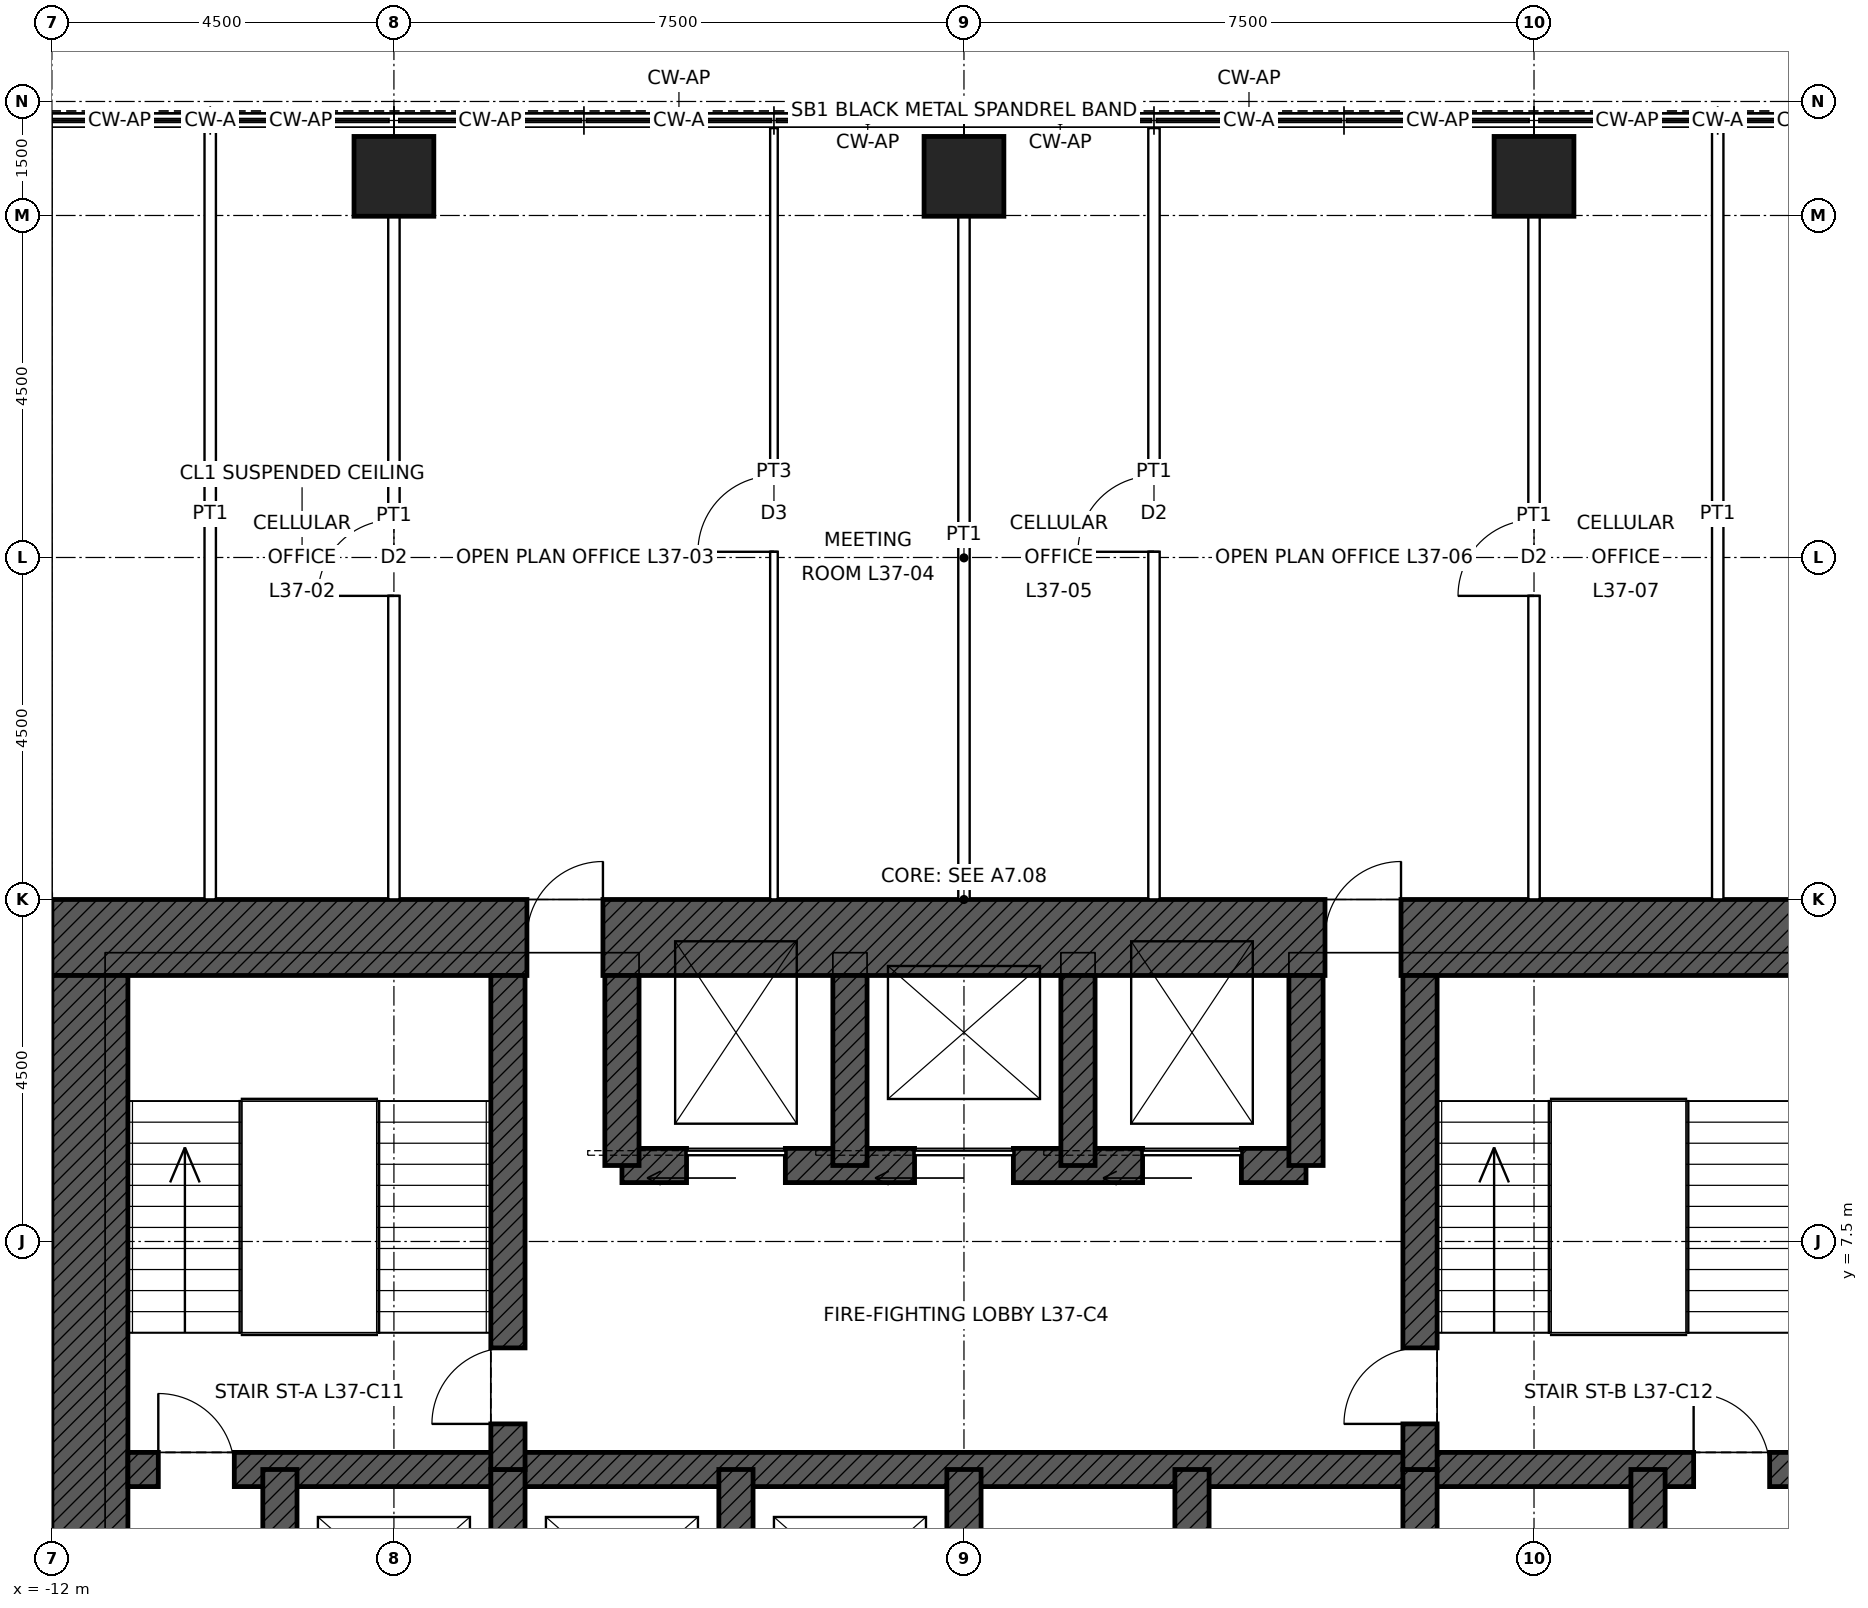
"""IFC4 building model, lengths in metres.
Left out: names, types, materials, properties, quantities, classifications, styles, units other than length and angle.
Written with IfcOpenShell. Run it as: python <this file> out.ifc"""

import sys

from ifc_helpers import new_model, si_unit, direction, frame, frame_2d, origin, origin_2d, place, context, subcontext, project, spatial, rectangle, hollow_rectangle, extrude, element, fill, save


model = new_model("IFC4")
c1 = context("Model", 3, precision=1e-05, world=origin(), true_north=direction((0.0, 1.0)))
c2 = subcontext(c1, "Body", "Model", "MODEL_VIEW")
j1 = project(units=[si_unit("LENGTHUNIT", "METRE"), si_unit("PLANEANGLEUNIT", "RADIAN")], contexts=[c1])
p1 = place(None, origin())
s1 = spatial("IfcSite", under=j1, at=p1, CompositionType="ELEMENT")
p2 = place(p1, origin())
s2 = spatial("IfcBuilding", under=s1, at=p2, CompositionType="ELEMENT")
p3 = place(p2, frame((0.0, 0.0, 181.9)))
s3 = spatial("IfcBuildingStorey", under=s2, at=p3, CompositionType="ELEMENT", Elevation=181.9)
p4 = place(p3, frame((-7.5, 21.515, 0.0), z_axis=(0.0, 0.0, 1.0), x_axis=(1.0, 0.0, 0.0)))
e1 = element("IfcColumn", 1, at=p4, inside=s3, PredefinedType="COLUMN", context=c2, shape_type="SweptSolid", body=[
    extrude(hollow_rectangle(XDim=1.05, YDim=1.05, WallThickness=0.075, at=origin_2d()), origin(), (0.0, 0.0, 1.0), 4.0),
])
p5 = place(p3, frame((0.0, 21.515, 0.0), z_axis=(0.0, 0.0, 1.0), x_axis=(1.0, 0.0, 0.0)))
e2 = element("IfcColumn", 2, at=p5, inside=s3, PredefinedType="COLUMN", context=c2, shape_type="SweptSolid", body=[
    extrude(hollow_rectangle(XDim=1.05, YDim=1.05, WallThickness=0.07, at=origin_2d()), origin(), (0.0, 0.0, 1.0), 4.0),
])
p6 = place(p3, frame((7.5, 21.515, 0.0), z_axis=(0.0, 0.0, 1.0), x_axis=(1.0, 0.0, 0.0)))
e3 = element("IfcColumn", 3, at=p6, inside=s3, PredefinedType="COLUMN", context=c2, shape_type="SweptSolid", body=[
    extrude(hollow_rectangle(XDim=1.05, YDim=1.05, WallThickness=0.075, at=origin_2d()), origin(), (0.0, 0.0, 1.0), 4.0),
])
p7 = place(p3, frame((-12.0, 11.5, 0.0), z_axis=(0.0, 0.0, 1.0), x_axis=(1.0, 0.0, 0.0)))
e4 = element("IfcWall", 4, at=p7, inside=s3, PredefinedType="SHEAR", context=c2, shape_type="SweptSolid", body=[
    extrude(rectangle(XDim=24.0, YDim=1.0, at=frame_2d((12.0, 0.0))), origin(), (0.0, 0.0, 1.0), 4.0),
])
p8 = place(p7, frame((6.25, 0.0, 0.0)))
e5 = element("IfcOpeningElement", 5, at=p8, cuts=e4, PredefinedType="OPENING", context=c2, shape_type="SweptSolid", body=[
    extrude(rectangle(XDim=1.0, YDim=2.4, at=frame_2d((0.5, 1.2))), frame((0.0, 0.51, 0.0), z_axis=(0.0, -1.0, 0.0), x_axis=(1.0, 0.0, 0.0)), (0.0, 0.0, 1.0), 1.02),
])
p9 = place(p7, frame((16.75, 0.0, 0.0)))
e6 = element("IfcOpeningElement", 6, at=p9, cuts=e4, PredefinedType="OPENING", context=c2, shape_type="SweptSolid", body=[
    extrude(rectangle(XDim=1.0, YDim=2.4, at=frame_2d((0.5, 1.2))), frame((0.0, 0.51, 0.0), z_axis=(0.0, -1.0, 0.0), x_axis=(1.0, 0.0, 0.0)), (0.0, 0.0, 1.0), 1.02),
])
p10 = place(p3, frame((-11.5, -11.0, 0.0), z_axis=(0.0, 0.0, 1.0), x_axis=(0.0, 1.0, 0.0)))
e7 = element("IfcWall", 7, at=p10, inside=s3, PredefinedType="SHEAR", context=c2, shape_type="SweptSolid", body=[
    extrude(rectangle(XDim=22.0, YDim=1.0, at=frame_2d((11.0, 0.0))), origin(), (0.0, 0.0, 1.0), 4.0),
])
p11 = place(p10, frame((10.5, 0.0, 0.0)))
e8 = element("IfcOpeningElement", 8, at=p11, cuts=e7, PredefinedType="OPENING", context=c2, shape_type="SweptSolid", body=[
    extrude(rectangle(XDim=1.0, YDim=2.4, at=frame_2d((0.5, 1.2))), frame((0.0, 0.51, 0.0), z_axis=(0.0, -1.0, 0.0), x_axis=(1.0, 0.0, 0.0)), (0.0, 0.0, 1.0), 1.02),
])
p12 = place(p3, frame((-11.0, 4.5, 0.0), z_axis=(0.0, 0.0, 1.0), x_axis=(1.0, 0.0, 0.0)))
e9 = element("IfcWall", 9, at=p12, inside=s3, PredefinedType="SHEAR", context=c2, shape_type="SweptSolid", body=[
    extrude(rectangle(XDim=22.0, YDim=0.45, at=frame_2d((11.0, 0.0))), origin(), (0.0, 0.0, 1.0), 4.0),
])
p13 = place(p12, frame((0.4, 0.0, 0.0)))
e10 = element("IfcOpeningElement", 10, at=p13, cuts=e9, PredefinedType="OPENING", context=c2, shape_type="SweptSolid", body=[
    extrude(rectangle(XDim=1.0, YDim=2.1, at=frame_2d((0.5, 1.05))), frame((0.0, 0.235, 0.0), z_axis=(0.0, -1.0, 0.0), x_axis=(1.0, 0.0, 0.0)), (0.0, 0.0, 1.0), 0.47),
])
p14 = place(p12, frame((20.6, 0.0, 0.0)))
e11 = element("IfcOpeningElement", 11, at=p14, cuts=e9, PredefinedType="OPENING", context=c2, shape_type="SweptSolid", body=[
    extrude(rectangle(XDim=1.0, YDim=2.1, at=frame_2d((0.5, 1.05))), frame((0.0, 0.235, 0.0), z_axis=(0.0, -1.0, 0.0), x_axis=(1.0, 0.0, 0.0)), (0.0, 0.0, 1.0), 0.47),
])
p15 = place(p3, frame((-4.5, 8.5, 0.0), z_axis=(0.0, 0.0, 1.0), x_axis=(1.0, 0.0, 0.0)))
e12 = element("IfcWall", 12, at=p15, inside=s3, PredefinedType="SHEAR", context=c2, shape_type="SweptSolid", body=[
    extrude(rectangle(XDim=9.0, YDim=0.45, at=frame_2d((4.5, 0.0))), origin(), (0.0, 0.0, 1.0), 4.0),
])
p16 = place(p15, frame((0.85, 0.0, 0.0)))
e13 = element("IfcOpeningElement", 13, at=p16, cuts=e12, PredefinedType="OPENING", context=c2, shape_type="SweptSolid", body=[
    extrude(rectangle(XDim=1.3, YDim=2.4, at=frame_2d((0.65, 1.2))), frame((0.0, 0.235, 0.0), z_axis=(0.0, -1.0, 0.0), x_axis=(1.0, 0.0, 0.0)), (0.0, 0.0, 1.0), 0.47),
])
p17 = place(p15, frame((6.85, 0.0, 0.0)))
e14 = element("IfcOpeningElement", 14, at=p17, cuts=e12, PredefinedType="OPENING", context=c2, shape_type="SweptSolid", body=[
    extrude(rectangle(XDim=1.3, YDim=2.4, at=frame_2d((0.65, 1.2))), frame((0.0, 0.235, 0.0), z_axis=(0.0, -1.0, 0.0), x_axis=(1.0, 0.0, 0.0)), (0.0, 0.0, 1.0), 0.47),
])
p18 = place(p15, frame((3.85, 0.0, 0.0)))
e15 = element("IfcOpeningElement", 15, at=p18, cuts=e12, PredefinedType="OPENING", context=c2, shape_type="SweptSolid", body=[
    extrude(rectangle(XDim=1.3, YDim=2.4, at=frame_2d((0.65, 1.2))), frame((0.0, 0.235, 0.0), z_axis=(0.0, -1.0, 0.0), x_axis=(1.0, 0.0, 0.0)), (0.0, 0.0, 1.0), 0.47),
])
for number, where, z_axis, x_axis in (
    (16, (-9.0, 1.5, 0.0), (0.0, 0.0, 1.0), (0.0, 1.0, 0.0)),
    (17, (9.0, 1.5, 0.0), (0.0, 0.0, 1.0), (0.0, 1.0, 0.0)),
    (18, (-6.0, 1.5, 0.0), (0.0, 0.0, 1.0), (0.0, 1.0, 0.0)),
    (19, (-3.0, 1.5, 0.0), (0.0, 0.0, 1.0), (0.0, 1.0, 0.0)),
    (20, (0.0, 1.5, 0.0), (0.0, 0.0, 1.0), (0.0, 1.0, 0.0)),
    (21, (3.0, 1.5, 0.0), (0.0, 0.0, 1.0), (0.0, 1.0, 0.0)),
    (22, (6.0, 1.5, 0.0), (0.0, 0.0, 1.0), (0.0, 1.0, 0.0)),
):
    element("IfcWall", number, at=place(p3, frame(where, z_axis=z_axis, x_axis=x_axis)), inside=s3, PredefinedType="SHEAR", context=c2, shape_type="SweptSolid", body=[
        extrude(rectangle(XDim=3.0, YDim=0.45, at=frame_2d((1.5, 0.0))), origin(), (0.0, 0.0, 1.0), 4.0),
    ])
p19 = place(p3, frame((-6.0, 4.5, 0.0), z_axis=(0.0, 0.0, 1.0), x_axis=(0.0, 1.0, 0.0)))
e23 = element("IfcWall", 23, at=p19, inside=s3, PredefinedType="SHEAR", context=c2, shape_type="SweptSolid", body=[
    extrude(rectangle(XDim=6.5, YDim=0.45, at=frame_2d((3.25, 0.0))), origin(), (0.0, 0.0, 1.0), 4.0),
])
p20 = place(p19, frame((0.6, 0.0, 0.0)))
e24 = element("IfcOpeningElement", 24, at=p20, cuts=e23, PredefinedType="OPENING", context=c2, shape_type="SweptSolid", body=[
    extrude(rectangle(XDim=1.0, YDim=2.1, at=frame_2d((0.5, 1.05))), frame((0.0, 0.235, 0.0), z_axis=(0.0, -1.0, 0.0), x_axis=(1.0, 0.0, 0.0)), (0.0, 0.0, 1.0), 0.47),
])
p21 = place(p3, frame((6.0, 4.5, 0.0), z_axis=(0.0, 0.0, 1.0), x_axis=(0.0, 1.0, 0.0)))
e25 = element("IfcWall", 25, at=p21, inside=s3, PredefinedType="SHEAR", context=c2, shape_type="SweptSolid", body=[
    extrude(rectangle(XDim=6.5, YDim=0.45, at=frame_2d((3.25, 0.0))), origin(), (0.0, 0.0, 1.0), 4.0),
])
p22 = place(p21, frame((0.6, 0.0, 0.0)))
e26 = element("IfcOpeningElement", 26, at=p22, cuts=e25, PredefinedType="OPENING", context=c2, shape_type="SweptSolid", body=[
    extrude(rectangle(XDim=1.0, YDim=2.1, at=frame_2d((0.5, 1.05))), frame((0.0, 0.235, 0.0), z_axis=(0.0, -1.0, 0.0), x_axis=(1.0, 0.0, 0.0)), (0.0, 0.0, 1.0), 0.47),
])
for number, where, z_axis, x_axis in (
    (27, (-4.5, 8.5, 0.0), (0.0, 0.0, 1.0), (0.0, 1.0, 0.0)),
    (28, (4.5, 8.5, 0.0), (0.0, 0.0, 1.0), (0.0, 1.0, 0.0)),
    (29, (-1.5, 8.5, 0.0), (0.0, 0.0, 1.0), (0.0, 1.0, 0.0)),
    (30, (1.5, 8.5, 0.0), (0.0, 0.0, 1.0), (0.0, 1.0, 0.0)),
):
    element("IfcWall", number, at=place(p3, frame(where, z_axis=z_axis, x_axis=x_axis)), inside=s3, PredefinedType="SHEAR", context=c2, shape_type="SweptSolid", body=[
        extrude(rectangle(XDim=2.5, YDim=0.45, at=frame_2d((1.25, 0.0))), origin(), (0.0, 0.0, 1.0), 4.0),
    ])
p23 = place(p3, frame((-9.917, 12.0, 0.0), z_axis=(0.0, 0.0, 1.0), x_axis=(0.0, 1.0, 0.0)))
e31 = element("IfcWall", 31, at=p23, inside=s3, PredefinedType="PARTITIONING", context=c2, shape_type="SweptSolid", body=[
    extrude(rectangle(XDim=10.15, YDim=0.15, at=frame_2d((5.075, 0.0))), origin(), (0.0, 0.0, 1.0), 3.85),
])
p24 = place(p3, frame((-7.5, 12.0, 0.0), z_axis=(0.0, 0.0, 1.0), x_axis=(0.0, 1.0, 0.0)))
e32 = element("IfcWall", 32, at=p24, inside=s3, PredefinedType="PARTITIONING", context=c2, shape_type="SweptSolid", body=[
    extrude(rectangle(XDim=8.99, YDim=0.15, at=frame_2d((4.495, 0.0))), origin(), (0.0, 0.0, 1.0), 3.238),
])
p25 = place(p24, frame((3.995, 0.0, 0.0)))
e33 = element("IfcOpeningElement", 33, at=p25, cuts=e32, PredefinedType="OPENING", context=c2, shape_type="SweptSolid", body=[
    extrude(rectangle(XDim=1.0, YDim=2.1, at=frame_2d((0.5, 1.05))), frame((0.0, 0.085, 0.0), z_axis=(0.0, -1.0, 0.0), x_axis=(1.0, 0.0, 0.0)), (0.0, 0.0, 1.0), 0.17),
])
p26 = place(p3, frame((-2.5, 12.0, 0.0), z_axis=(0.0, 0.0, 1.0), x_axis=(0.0, 1.0, 0.0)))
e34 = element("IfcWall", 34, at=p26, inside=s3, PredefinedType="PARTITIONING", context=c2, shape_type="SweptSolid", body=[
    extrude(rectangle(XDim=10.15, YDim=0.1, at=frame_2d((5.075, 0.0))), origin(), (0.0, 0.0, 1.0), 3.85),
])
p27 = place(p26, frame((4.575, 0.0, 0.0)))
e35 = element("IfcOpeningElement", 35, at=p27, cuts=e34, PredefinedType="OPENING", context=c2, shape_type="SweptSolid", body=[
    extrude(rectangle(XDim=1.0, YDim=2.1, at=frame_2d((0.5, 1.05))), frame((0.0, 0.06, 0.0), z_axis=(0.0, -1.0, 0.0), x_axis=(1.0, 0.0, 0.0)), (0.0, 0.0, 1.0), 0.12),
])
p28 = place(p3, frame((0.0, 12.0, 0.0), z_axis=(0.0, 0.0, 1.0), x_axis=(0.0, 1.0, 0.0)))
e36 = element("IfcWall", 36, at=p28, inside=s3, PredefinedType="PARTITIONING", context=c2, shape_type="SweptSolid", body=[
    extrude(rectangle(XDim=8.99, YDim=0.15, at=frame_2d((4.495, 0.0))), origin(), (0.0, 0.0, 1.0), 3.238),
])
p29 = place(p3, frame((2.5, 12.0, 0.0), z_axis=(0.0, 0.0, 1.0), x_axis=(0.0, 1.0, 0.0)))
e37 = element("IfcWall", 37, at=p29, inside=s3, PredefinedType="PARTITIONING", context=c2, shape_type="SweptSolid", body=[
    extrude(rectangle(XDim=10.15, YDim=0.15, at=frame_2d((5.075, 0.0))), origin(), (0.0, 0.0, 1.0), 3.85),
])
p30 = place(p29, frame((4.575, 0.0, 0.0)))
e38 = element("IfcOpeningElement", 38, at=p30, cuts=e37, PredefinedType="OPENING", context=c2, shape_type="SweptSolid", body=[
    extrude(rectangle(XDim=1.0, YDim=2.1, at=frame_2d((0.5, 1.05))), frame((0.0, 0.085, 0.0), z_axis=(0.0, -1.0, 0.0), x_axis=(1.0, 0.0, 0.0)), (0.0, 0.0, 1.0), 0.17),
])
p31 = place(p3, frame((7.5, 12.0, 0.0), z_axis=(0.0, 0.0, 1.0), x_axis=(0.0, 1.0, 0.0)))
e39 = element("IfcWall", 39, at=p31, inside=s3, PredefinedType="PARTITIONING", context=c2, shape_type="SweptSolid", body=[
    extrude(rectangle(XDim=8.99, YDim=0.15, at=frame_2d((4.495, 0.0))), origin(), (0.0, 0.0, 1.0), 3.238),
])
p32 = place(p31, frame((3.995, 0.0, 0.0)))
e40 = element("IfcOpeningElement", 40, at=p32, cuts=e39, PredefinedType="OPENING", context=c2, shape_type="SweptSolid", body=[
    extrude(rectangle(XDim=1.0, YDim=2.1, at=frame_2d((0.5, 1.05))), frame((0.0, 0.085, 0.0), z_axis=(0.0, -1.0, 0.0), x_axis=(1.0, 0.0, 0.0)), (0.0, 0.0, 1.0), 0.17),
])
p33 = place(p3, frame((9.917, 12.0, 0.0), z_axis=(0.0, 0.0, 1.0), x_axis=(0.0, 1.0, 0.0)))
e41 = element("IfcWall", 41, at=p33, inside=s3, PredefinedType="PARTITIONING", context=c2, shape_type="SweptSolid", body=[
    extrude(rectangle(XDim=10.15, YDim=0.15, at=frame_2d((5.075, 0.0))), origin(), (0.0, 0.0, 1.0), 3.85),
])
p34 = place(p13, origin())
e42 = element("IfcDoor", 42, at=p34, inside=s3, OperationType="SINGLE_SWING_LEFT", PredefinedType="DOOR", context=c2, shape_type="SweptSolid", body=[
    extrude(rectangle(XDim=1.0, YDim=2.1, at=frame_2d((0.5, 1.05))), frame((0.0, 0.025, 0.0), z_axis=(0.0, -1.0, 0.0), x_axis=(1.0, 0.0, 0.0)), (0.0, 0.0, 1.0), 0.05),
])
fill(e10, e42)
p35 = place(p14, origin())
e43 = element("IfcDoor", 43, at=p35, inside=s3, OperationType="SINGLE_SWING_LEFT", PredefinedType="DOOR", context=c2, shape_type="SweptSolid", body=[
    extrude(rectangle(XDim=1.0, YDim=2.1, at=frame_2d((0.5, 1.05))), frame((0.0, 0.025, 0.0), z_axis=(0.0, -1.0, 0.0), x_axis=(1.0, 0.0, 0.0)), (0.0, 0.0, 1.0), 0.05),
])
fill(e11, e43)
p36 = place(p20, origin())
e44 = element("IfcDoor", 44, at=p36, inside=s3, OperationType="SINGLE_SWING_LEFT", PredefinedType="DOOR", context=c2, shape_type="SweptSolid", body=[
    extrude(rectangle(XDim=1.0, YDim=2.1, at=frame_2d((0.5, 1.05))), frame((0.0, 0.025, 0.0), z_axis=(0.0, -1.0, 0.0), x_axis=(1.0, 0.0, 0.0)), (0.0, 0.0, 1.0), 0.05),
])
fill(e24, e44)
p37 = place(p22, origin())
e45 = element("IfcDoor", 45, at=p37, inside=s3, OperationType="SINGLE_SWING_LEFT", PredefinedType="DOOR", context=c2, shape_type="SweptSolid", body=[
    extrude(rectangle(XDim=1.0, YDim=2.1, at=frame_2d((0.5, 1.05))), frame((0.0, 0.025, 0.0), z_axis=(0.0, -1.0, 0.0), x_axis=(1.0, 0.0, 0.0)), (0.0, 0.0, 1.0), 0.05),
])
fill(e26, e45)
p38 = place(p8, origin())
e46 = element("IfcDoor", 46, at=p38, inside=s3, OperationType="SINGLE_SWING_RIGHT", PredefinedType="DOOR", context=c2, shape_type="SweptSolid", body=[
    extrude(rectangle(XDim=1.0, YDim=2.4, at=frame_2d((0.5, 1.2))), frame((0.0, 0.485, 0.0), z_axis=(0.0, -1.0, 0.0), x_axis=(1.0, 0.0, 0.0)), (0.0, 0.0, 1.0), 0.05),
])
fill(e5, e46)
p39 = place(p9, origin())
e47 = element("IfcDoor", 47, at=p39, inside=s3, OperationType="SINGLE_SWING_RIGHT", PredefinedType="DOOR", context=c2, shape_type="SweptSolid", body=[
    extrude(rectangle(XDim=1.0, YDim=2.4, at=frame_2d((0.5, 1.2))), frame((0.0, 0.485, 0.0), z_axis=(0.0, -1.0, 0.0), x_axis=(1.0, 0.0, 0.0)), (0.0, 0.0, 1.0), 0.05),
])
fill(e6, e47)
p40 = place(p16, origin())
e48 = element("IfcDoor", 48, at=p40, inside=s3, OperationType="SLIDING_TO_LEFT", PredefinedType="DOOR", context=c2, shape_type="SweptSolid", body=[
    extrude(rectangle(XDim=1.3, YDim=2.4, at=frame_2d((0.65, 1.2))), frame((0.0, 0.025, 0.0), z_axis=(0.0, -1.0, 0.0), x_axis=(1.0, 0.0, 0.0)), (0.0, 0.0, 1.0), 0.05),
])
fill(e13, e48)
p41 = place(p17, origin())
e49 = element("IfcDoor", 49, at=p41, inside=s3, OperationType="SLIDING_TO_LEFT", PredefinedType="DOOR", context=c2, shape_type="SweptSolid", body=[
    extrude(rectangle(XDim=1.3, YDim=2.4, at=frame_2d((0.65, 1.2))), frame((0.0, 0.025, 0.0), z_axis=(0.0, -1.0, 0.0), x_axis=(1.0, 0.0, 0.0)), (0.0, 0.0, 1.0), 0.05),
])
fill(e14, e49)
p42 = place(p18, origin())
e50 = element("IfcDoor", 50, at=p42, inside=s3, OperationType="SLIDING_TO_LEFT", PredefinedType="DOOR", context=c2, shape_type="SweptSolid", body=[
    extrude(rectangle(XDim=1.3, YDim=2.4, at=frame_2d((0.65, 1.2))), frame((0.0, 0.025, 0.0), z_axis=(0.0, -1.0, 0.0), x_axis=(1.0, 0.0, 0.0)), (0.0, 0.0, 1.0), 0.05),
])
fill(e15, e50)
p43 = place(p25, origin())
e51 = element("IfcDoor", 51, at=p43, inside=s3, OperationType="SINGLE_SWING_LEFT", PredefinedType="DOOR", context=c2, shape_type="SweptSolid", body=[
    extrude(rectangle(XDim=1.0, YDim=2.1, at=frame_2d((0.5, 1.05))), frame((0.0, 0.025, 0.0), z_axis=(0.0, -1.0, 0.0), x_axis=(1.0, 0.0, 0.0)), (0.0, 0.0, 1.0), 0.05),
])
fill(e33, e51)
p44 = place(p27, origin())
e52 = element("IfcDoor", 52, at=p44, inside=s3, OperationType="SINGLE_SWING_LEFT", PredefinedType="DOOR", context=c2, shape_type="SweptSolid", body=[
    extrude(rectangle(XDim=1.0, YDim=2.1, at=frame_2d((0.5, 1.05))), frame((0.0, 0.025, 0.0), z_axis=(0.0, -1.0, 0.0), x_axis=(1.0, 0.0, 0.0)), (0.0, 0.0, 1.0), 0.05),
])
fill(e35, e52)
p45 = place(p30, origin())
e53 = element("IfcDoor", 53, at=p45, inside=s3, OperationType="SINGLE_SWING_LEFT", PredefinedType="DOOR", context=c2, shape_type="SweptSolid", body=[
    extrude(rectangle(XDim=1.0, YDim=2.1, at=frame_2d((0.5, 1.05))), frame((0.0, 0.025, 0.0), z_axis=(0.0, -1.0, 0.0), x_axis=(1.0, 0.0, 0.0)), (0.0, 0.0, 1.0), 0.05),
])
fill(e38, e53)
p46 = place(p32, origin())
e54 = element("IfcDoor", 54, at=p46, inside=s3, OperationType="SINGLE_SWING_LEFT", PredefinedType="DOOR", context=c2, shape_type="SweptSolid", body=[
    extrude(rectangle(XDim=1.0, YDim=2.1, at=frame_2d((0.5, 1.05))), frame((0.0, 0.025, 0.0), z_axis=(0.0, -1.0, 0.0), x_axis=(1.0, 0.0, 0.0)), (0.0, 0.0, 1.0), 0.05),
])
fill(e40, e54)
save(model, sys.argv[1])
